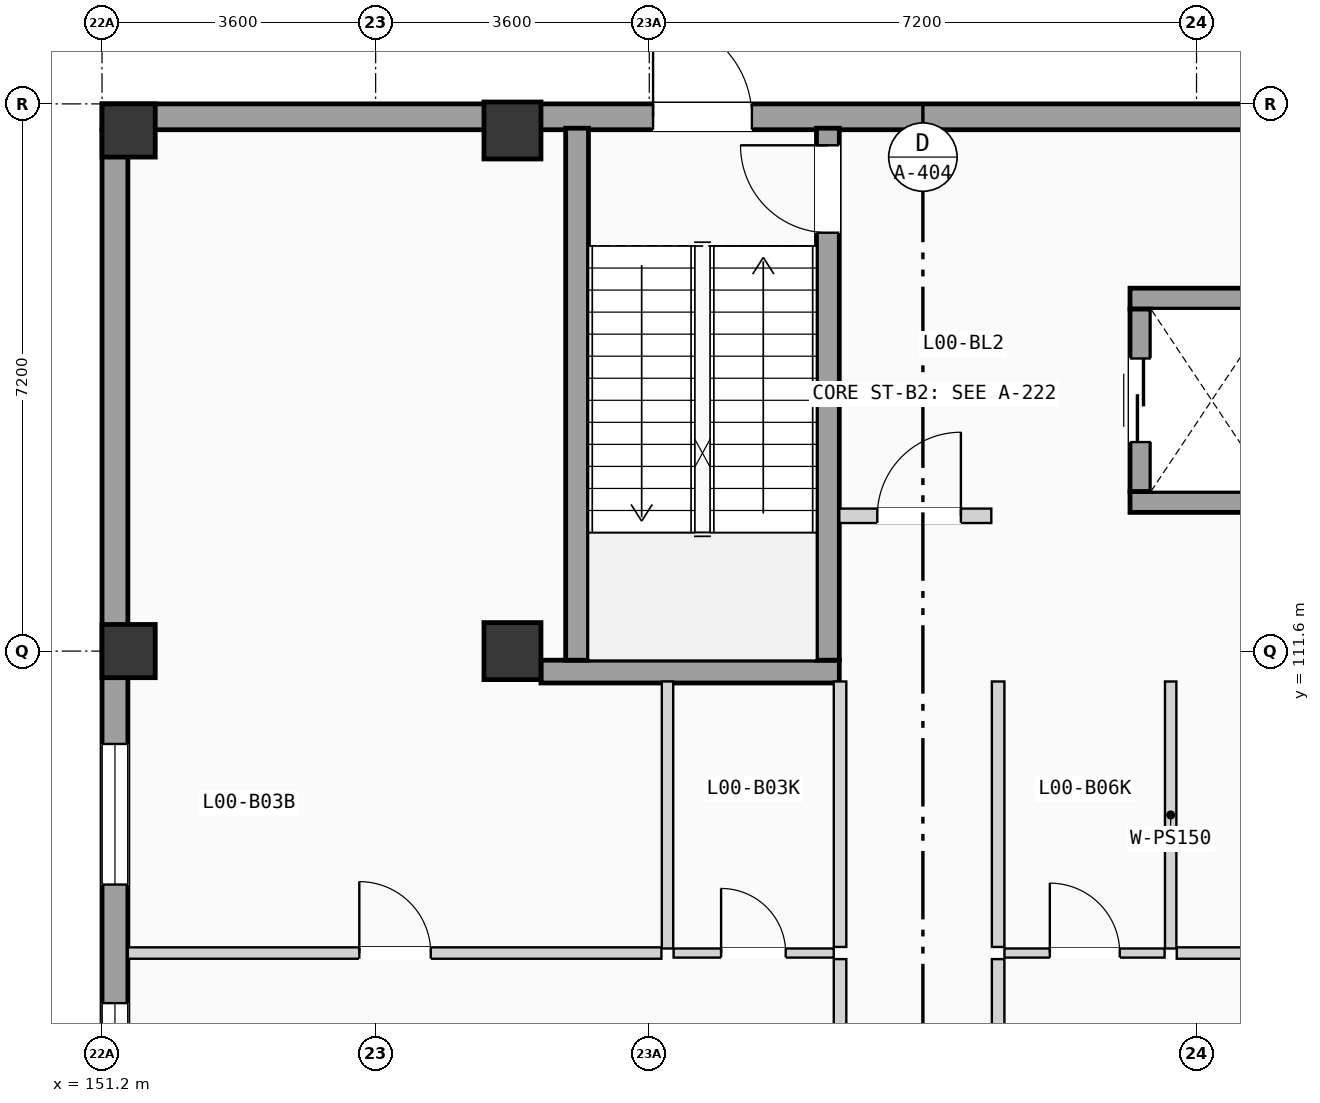
"""IFC4 building model, lengths in metres.
Left out: names, types, materials, properties, quantities, classifications, styles, units other than length and angle.
Written with IfcOpenShell. Run it as: python <this file> out.ifc"""

import sys

from ifc_helpers import new_model, si_unit, direction, frame, frame_2d, origin, origin_2d, place, context, subcontext, project, spatial, rectangle, extrude, element, fill, save


model = new_model("IFC4")
c1 = context("Model", 3, precision=1e-05, world=origin(), true_north=direction((0.0, 1.0)))
c2 = subcontext(c1, "Body", "Model", "MODEL_VIEW")
j1 = project(units=[si_unit("LENGTHUNIT", "METRE"), si_unit("PLANEANGLEUNIT", "RADIAN")], contexts=[c1])
p1 = place(None, origin())
s1 = spatial("IfcSite", under=j1, at=p1, CompositionType="ELEMENT")
p2 = place(p1, origin())
s2 = spatial("IfcBuilding", under=s1, at=p2, CompositionType="ELEMENT")
p3 = place(p2, origin())
s3 = spatial("IfcBuildingStorey", under=s2, at=p3, CompositionType="ELEMENT", Elevation=0.0)
for number, where, z_axis, x_axis in (
    (1, (151.55, 111.6, 0.0), (0.0, 0.0, 1.0), (1.0, 0.0, 0.0)),
    (2, (151.55, 118.45, 0.0), (0.0, 0.0, 1.0), (1.0, 0.0, 0.0)),
):
    element("IfcColumn", number, at=place(p3, frame(where, z_axis=z_axis, x_axis=x_axis)), inside=s3, PredefinedType="COLUMN", context=c2, shape_type="SweptSolid", body=[
        extrude(rectangle(XDim=0.7, YDim=0.7, at=origin_2d()), origin(), (0.0, 0.0, 1.0), 4.9),
    ])
for number, where, z_axis, x_axis in (
    (3, (156.6, 111.6, 0.0), (0.0, 0.0, 1.0), (1.0, 0.0, 0.0)),
    (4, (156.6, 118.45, 0.0), (0.0, 0.0, 1.0), (1.0, 0.0, 0.0)),
):
    element("IfcColumn", number, at=place(p3, frame(where, z_axis=z_axis, x_axis=x_axis)), inside=s3, PredefinedType="COLUMN", context=c2, shape_type="SweptSolid", body=[
        extrude(rectangle(XDim=0.75, YDim=0.75, at=origin_2d()), origin(), (0.0, 0.0, 1.0), 4.9),
    ])
p4 = place(p3, frame((151.2, 118.63, 0.0), z_axis=(0.0, 0.0, 1.0), x_axis=(1.0, 0.0, 0.0)))
e5 = element("IfcWall", 5, at=p4, inside=s3, PredefinedType="SOLIDWALL", context=c2, shape_type="SweptSolid", body=[
    extrude(rectangle(XDim=21.6, YDim=0.34, at=frame_2d((10.8, 0.0))), origin(), (0.0, 0.0, 1.0), 4.64),
])
p5 = place(p4, frame((7.25, 0.0, 0.0)))
e6 = element("IfcOpeningElement", 6, at=p5, cuts=e5, PredefinedType="OPENING", context=c2, shape_type="SweptSolid", body=[
    extrude(rectangle(XDim=1.3, YDim=2.2, at=frame_2d((0.65, 1.1))), frame((0.0, 0.18, 0.0), z_axis=(0.0, -1.0, 0.0), x_axis=(1.0, 0.0, 0.0)), (0.0, 0.0, 1.0), 0.36),
])
p6 = place(p3, frame((151.37, 68.74, 0.0), z_axis=(0.0, 0.0, 1.0), x_axis=(0.0, 1.0, 0.0)))
e7 = element("IfcWall", 7, at=p6, inside=s3, PredefinedType="SOLIDWALL", context=c2, shape_type="SweptSolid", body=[
    extrude(rectangle(XDim=49.72, YDim=0.34, at=frame_2d((24.86, 0.0))), origin(), (0.0, 0.0, 1.0), 4.64),
])
p7 = place(p6, frame((11.552, 0.0, 0.9)))
e8 = element("IfcOpeningElement", 8, at=p7, cuts=e7, PredefinedType="OPENING", context=c2, shape_type="SweptSolid", body=[
    extrude(rectangle(XDim=1.6, YDim=1.65, at=frame_2d((0.8, 0.825))), frame((0.0, 0.18, 0.0), z_axis=(0.0, -1.0, 0.0), x_axis=(1.0, 0.0, 0.0)), (0.0, 0.0, 1.0), 0.36),
])
p8 = place(p6, frame((8.207, 0.0, 0.9)))
e9 = element("IfcOpeningElement", 9, at=p8, cuts=e7, PredefinedType="OPENING", context=c2, shape_type="SweptSolid", body=[
    extrude(rectangle(XDim=1.6, YDim=1.8, at=frame_2d((0.8, 0.9))), frame((0.0, 0.18, 0.0), z_axis=(0.0, -1.0, 0.0), x_axis=(1.0, 0.0, 0.0)), (0.0, 0.0, 1.0), 0.36),
])
p9 = place(p6, frame((16.18, 0.0, 0.9)))
e10 = element("IfcOpeningElement", 10, at=p9, cuts=e7, PredefinedType="OPENING", context=c2, shape_type="SweptSolid", body=[
    extrude(rectangle(XDim=1.72, YDim=1.2, at=frame_2d((0.86, 0.6))), frame((0.0, 0.18, 0.0), z_axis=(0.0, -1.0, 0.0), x_axis=(1.0, 0.0, 0.0)), (0.0, 0.0, 1.0), 0.36),
])
p10 = place(p6, frame((24.0, 0.0, 0.9)))
e11 = element("IfcOpeningElement", 11, at=p10, cuts=e7, PredefinedType="OPENING", context=c2, shape_type="SweptSolid", body=[
    extrude(rectangle(XDim=1.72, YDim=1.35, at=frame_2d((0.86, 0.675))), frame((0.0, 0.18, 0.0), z_axis=(0.0, -1.0, 0.0), x_axis=(1.0, 0.0, 0.0)), (0.0, 0.0, 1.0), 0.36),
])
p11 = place(p6, frame((19.503, 0.0, 0.85)))
e12 = element("IfcOpeningElement", 12, at=p11, cuts=e7, PredefinedType="OPENING", context=c2, shape_type="SweptSolid", body=[
    extrude(rectangle(XDim=0.95, YDim=1.2, at=frame_2d((0.475, 0.6))), frame((0.0, 0.18, 0.0), z_axis=(0.0, -1.0, 0.0), x_axis=(1.0, 0.0, 0.0)), (0.0, 0.0, 1.0), 0.36),
])
p12 = place(p6, frame((29.267, 0.0, 0.85)))
e13 = element("IfcOpeningElement", 13, at=p12, cuts=e7, PredefinedType="OPENING", context=c2, shape_type="SweptSolid", body=[
    extrude(rectangle(XDim=0.95, YDim=1.2, at=frame_2d((0.475, 0.6))), frame((0.0, 0.18, 0.0), z_axis=(0.0, -1.0, 0.0), x_axis=(1.0, 0.0, 0.0)), (0.0, 0.0, 1.0), 0.36),
])
p13 = place(p6, frame((36.508, 0.0, 0.9)))
e14 = element("IfcOpeningElement", 14, at=p13, cuts=e7, PredefinedType="OPENING", context=c2, shape_type="SweptSolid", body=[
    extrude(rectangle(XDim=1.72, YDim=1.8, at=frame_2d((0.86, 0.9))), frame((0.0, 0.18, 0.0), z_axis=(0.0, -1.0, 0.0), x_axis=(1.0, 0.0, 0.0)), (0.0, 0.0, 1.0), 0.36),
])
p14 = place(p6, frame((31.756, 0.0, 0.9)))
e15 = element("IfcOpeningElement", 15, at=p14, cuts=e7, PredefinedType="OPENING", context=c2, shape_type="SweptSolid", body=[
    extrude(rectangle(XDim=1.85, YDim=1.2, at=frame_2d((0.925, 0.6))), frame((0.0, 0.18, 0.0), z_axis=(0.0, -1.0, 0.0), x_axis=(1.0, 0.0, 0.0)), (0.0, 0.0, 1.0), 0.36),
])
p15 = place(p6, frame((39.788, 0.0, 0.9)))
e16 = element("IfcOpeningElement", 16, at=p15, cuts=e7, PredefinedType="OPENING", context=c2, shape_type="SweptSolid", body=[
    extrude(rectangle(XDim=1.85, YDim=1.35, at=frame_2d((0.925, 0.675))), frame((0.0, 0.18, 0.0), z_axis=(0.0, -1.0, 0.0), x_axis=(1.0, 0.0, 0.0)), (0.0, 0.0, 1.0), 0.36),
])
p16 = place(p3, frame((156.975, 111.33, 0.0), z_axis=(0.0, 0.0, 1.0), x_axis=(1.0, 0.0, 0.0)))
e17 = element("IfcWall", 17, at=p16, inside=s3, PredefinedType="SHEAR", context=c2, shape_type="SweptSolid", body=[
    extrude(rectangle(XDim=3.925, YDim=0.3, at=frame_2d((1.962, 0.0))), origin(), (0.0, 0.0, 1.0), 4.64),
])
p17 = place(p3, frame((157.45, 111.48, 0.0), z_axis=(0.0, 0.0, 1.0), x_axis=(0.0, 1.0, 0.0)))
e18 = element("IfcWall", 18, at=p17, inside=s3, PredefinedType="SHEAR", context=c2, shape_type="SweptSolid", body=[
    extrude(rectangle(XDim=7.0, YDim=0.3, at=frame_2d((3.5, 0.0))), origin(), (0.0, 0.0, 1.0), 4.64),
])
p18 = place(p3, frame((160.75, 111.48, 0.0), z_axis=(0.0, 0.0, 1.0), x_axis=(0.0, 1.0, 0.0)))
e19 = element("IfcWall", 19, at=p18, inside=s3, PredefinedType="SHEAR", context=c2, shape_type="SweptSolid", body=[
    extrude(rectangle(XDim=7.0, YDim=0.3, at=frame_2d((3.5, 0.0))), origin(), (0.0, 0.0, 1.0), 4.64),
])
p19 = place(p18, frame((5.625, 0.0, 0.0)))
e20 = element("IfcOpeningElement", 20, at=p19, cuts=e19, PredefinedType="OPENING", context=c2, shape_type="SweptSolid", body=[
    extrude(rectangle(XDim=1.15, YDim=2.12, at=frame_2d((0.575, 1.06))), frame((0.0, 0.16, 0.0), z_axis=(0.0, -1.0, 0.0), x_axis=(1.0, 0.0, 0.0)), (0.0, 0.0, 1.0), 0.32),
])
for number, where, z_axis, x_axis in (
    (21, (164.725, 113.562, 0.0), (0.0, 0.0, 1.0), (1.0, 0.0, 0.0)),
    (22, (164.725, 116.238, 0.0), (0.0, 0.0, 1.0), (1.0, 0.0, 0.0)),
):
    element("IfcWall", number, at=place(p3, frame(where, z_axis=z_axis, x_axis=x_axis)), inside=s3, PredefinedType="SHEAR", context=c2, shape_type="SweptSolid", body=[
        extrude(rectangle(XDim=2.15, YDim=0.275, at=frame_2d((1.075, 0.0))), origin(), (0.0, 0.0, 1.0), 4.64),
    ])
p20 = place(p3, frame((164.863, 113.7, 0.0), z_axis=(0.0, 0.0, 1.0), x_axis=(0.0, 1.0, 0.0)))
e23 = element("IfcWall", 23, at=p20, inside=s3, PredefinedType="SHEAR", context=c2, shape_type="SweptSolid", body=[
    extrude(rectangle(XDim=2.4, YDim=0.275, at=frame_2d((1.2, 0.0))), origin(), (0.0, 0.0, 1.0), 4.64),
])
p21 = place(p20, frame((0.65, 0.0, 0.0)))
e24 = element("IfcOpeningElement", 24, at=p21, cuts=e23, PredefinedType="OPENING", context=c2, shape_type="SweptSolid", body=[
    extrude(rectangle(XDim=1.1, YDim=2.15, at=frame_2d((0.55, 1.075))), frame((0.0, 0.147, 0.0), z_axis=(0.0, -1.0, 0.0), x_axis=(1.0, 0.0, 0.0)), (0.0, 0.0, 1.0), 0.295),
])
p22 = place(p3, frame((160.9, 113.38, 0.0), z_axis=(0.0, 0.0, 1.0), x_axis=(1.0, 0.0, 0.0)))
e25 = element("IfcWall", 25, at=p22, inside=s3, PredefinedType="PARTITIONING", context=c2, shape_type="SweptSolid", body=[
    extrude(rectangle(XDim=2.0, YDim=0.19, at=frame_2d((1.0, 0.0))), origin(), (0.0, 0.0, 1.0), 3.84),
])
p23 = place(p22, frame((0.5, 0.0, 0.0)))
e26 = element("IfcOpeningElement", 26, at=p23, cuts=e25, PredefinedType="OPENING", context=c2, shape_type="SweptSolid", body=[
    extrude(rectangle(XDim=1.1, YDim=2.12, at=frame_2d((0.55, 1.06))), frame((0.0, 0.105, 0.0), z_axis=(0.0, -1.0, 0.0), x_axis=(1.0, 0.0, 0.0)), (0.0, 0.0, 1.0), 0.21),
])
p24 = place(p3, frame((160.91, 103.327, 0.0), z_axis=(0.0, 0.0, 1.0), x_axis=(0.0, 1.0, 0.0)))
e27 = element("IfcWall", 27, at=p24, inside=s3, PredefinedType="PARTITIONING", context=c2, shape_type="SweptSolid", body=[
    extrude(rectangle(XDim=4.22, YDim=0.165, at=frame_2d((2.11, 0.0))), origin(), (0.0, 0.0, 1.0), 3.84),
])
p25 = place(p24, frame((1.605, 0.0, 0.0)))
e28 = element("IfcOpeningElement", 28, at=p25, cuts=e27, PredefinedType="OPENING", context=c2, shape_type="SweptSolid", body=[
    extrude(rectangle(XDim=1.01, YDim=2.11, at=frame_2d((0.505, 1.055))), frame((0.0, 0.093, 0.0), z_axis=(0.0, -1.0, 0.0), x_axis=(1.0, 0.0, 0.0)), (0.0, 0.0, 1.0), 0.185),
])
p26 = place(p3, frame((160.91, 107.707, 0.0), z_axis=(0.0, 0.0, 1.0), x_axis=(0.0, 1.0, 0.0)))
e29 = element("IfcWall", 29, at=p26, inside=s3, PredefinedType="PARTITIONING", context=c2, shape_type="SweptSolid", body=[
    extrude(rectangle(XDim=3.493, YDim=0.165, at=frame_2d((1.747, 0.0))), origin(), (0.0, 0.0, 1.0), 3.84),
])
p27 = place(p3, frame((162.99, 103.327, 0.0), z_axis=(0.0, 0.0, 1.0), x_axis=(0.0, 1.0, 0.0)))
e30 = element("IfcWall", 30, at=p27, inside=s3, PredefinedType="PARTITIONING", context=c2, shape_type="SweptSolid", body=[
    extrude(rectangle(XDim=4.22, YDim=0.165, at=frame_2d((2.11, 0.0))), origin(), (0.0, 0.0, 1.0), 3.84),
])
p28 = place(p27, frame((1.605, 0.0, 0.0)))
e31 = element("IfcOpeningElement", 31, at=p28, cuts=e30, PredefinedType="OPENING", context=c2, shape_type="SweptSolid", body=[
    extrude(rectangle(XDim=1.01, YDim=2.11, at=frame_2d((0.505, 1.055))), frame((0.0, 0.093, 0.0), z_axis=(0.0, -1.0, 0.0), x_axis=(1.0, 0.0, 0.0)), (0.0, 0.0, 1.0), 0.185),
])
p29 = place(p3, frame((162.99, 107.707, 0.0), z_axis=(0.0, 0.0, 1.0), x_axis=(0.0, 1.0, 0.0)))
e32 = element("IfcWall", 32, at=p29, inside=s3, PredefinedType="PARTITIONING", context=c2, shape_type="SweptSolid", body=[
    extrude(rectangle(XDim=3.493, YDim=0.165, at=frame_2d((1.747, 0.0))), origin(), (0.0, 0.0, 1.0), 3.84),
])
p30 = place(p3, frame((158.72, 107.627, 0.0), z_axis=(0.0, 0.0, 1.0), x_axis=(1.0, 0.0, 0.0)))
e33 = element("IfcWall", 33, at=p30, inside=s3, PredefinedType="PARTITIONING", context=c2, shape_type="SweptSolid", body=[
    extrude(rectangle(XDim=2.107, YDim=0.12, at=frame_2d((1.053, 0.0))), origin(), (0.0, 0.0, 1.0), 3.84),
])
p31 = place(p30, frame((0.625, 0.0, 0.0)))
e34 = element("IfcOpeningElement", 34, at=p31, cuts=e33, PredefinedType="OPENING", context=c2, shape_type="SweptSolid", body=[
    extrude(rectangle(XDim=0.85, YDim=2.01, at=frame_2d((0.425, 1.005))), frame((0.0, 0.07, 0.0), z_axis=(0.0, -1.0, 0.0), x_axis=(1.0, 0.0, 0.0)), (0.0, 0.0, 1.0), 0.14),
])
p32 = place(p3, frame((151.54, 107.627, 0.0), z_axis=(0.0, 0.0, 1.0), x_axis=(1.0, 0.0, 0.0)))
e35 = element("IfcWall", 35, at=p32, inside=s3, PredefinedType="PARTITIONING", context=c2, shape_type="SweptSolid", body=[
    extrude(rectangle(XDim=7.02, YDim=0.15, at=frame_2d((3.51, 0.0))), origin(), (0.0, 0.0, 1.0), 3.84),
])
p33 = place(p32, frame((3.045, 0.0, 0.0)))
e36 = element("IfcOpeningElement", 36, at=p33, cuts=e35, PredefinedType="OPENING", context=c2, shape_type="SweptSolid", body=[
    extrude(rectangle(XDim=0.94, YDim=2.06, at=frame_2d((0.47, 1.03))), frame((0.0, 0.085, 0.0), z_axis=(0.0, -1.0, 0.0), x_axis=(1.0, 0.0, 0.0)), (0.0, 0.0, 1.0), 0.17),
])
p34 = place(p3, frame((158.64, 107.687, 0.0), z_axis=(0.0, 0.0, 1.0), x_axis=(0.0, 1.0, 0.0)))
e37 = element("IfcWall", 37, at=p34, inside=s3, PredefinedType="PARTITIONING", context=c2, shape_type="SweptSolid", body=[
    extrude(rectangle(XDim=3.513, YDim=0.15, at=frame_2d((1.756, 0.0))), origin(), (0.0, 0.0, 1.0), 3.84),
])
p35 = place(p3, frame((163.073, 107.627, 0.0), z_axis=(0.0, 0.0, 1.0), x_axis=(1.0, 0.0, 0.0)))
e38 = element("IfcWall", 38, at=p35, inside=s3, PredefinedType="PARTITIONING", context=c2, shape_type="SweptSolid", body=[
    extrude(rectangle(XDim=2.107, YDim=0.12, at=frame_2d((1.053, 0.0))), origin(), (0.0, 0.0, 1.0), 3.84),
])
p36 = place(p35, frame((0.597, 0.0, 0.0)))
e39 = element("IfcOpeningElement", 39, at=p36, cuts=e38, PredefinedType="OPENING", context=c2, shape_type="SweptSolid", body=[
    extrude(rectangle(XDim=0.92, YDim=2.02, at=frame_2d((0.46, 1.01))), frame((0.0, 0.07, 0.0), z_axis=(0.0, -1.0, 0.0), x_axis=(1.0, 0.0, 0.0)), (0.0, 0.0, 1.0), 0.14),
])
p37 = place(p3, frame((165.34, 107.627, 0.0), z_axis=(0.0, 0.0, 1.0), x_axis=(1.0, 0.0, 0.0)))
e40 = element("IfcWall", 40, at=p37, inside=s3, PredefinedType="PARTITIONING", context=c2, shape_type="SweptSolid", body=[
    extrude(rectangle(XDim=7.12, YDim=0.15, at=frame_2d((3.56, 0.0))), origin(), (0.0, 0.0, 1.0), 3.84),
])
p38 = place(p37, frame((3.035, 0.0, 0.0)))
e41 = element("IfcOpeningElement", 41, at=p38, cuts=e40, PredefinedType="OPENING", context=c2, shape_type="SweptSolid", body=[
    extrude(rectangle(XDim=1.04, YDim=2.08, at=frame_2d((0.52, 1.04))), frame((0.0, 0.085, 0.0), z_axis=(0.0, -1.0, 0.0), x_axis=(1.0, 0.0, 0.0)), (0.0, 0.0, 1.0), 0.17),
])
p39 = place(p3, frame((165.26, 107.687, 0.0), z_axis=(0.0, 0.0, 1.0), x_axis=(0.0, 1.0, 0.0)))
e42 = element("IfcWall", 42, at=p39, inside=s3, PredefinedType="PARTITIONING", context=c2, shape_type="SweptSolid", body=[
    extrude(rectangle(XDim=3.513, YDim=0.15, at=frame_2d((1.756, 0.0))), origin(), (0.0, 0.0, 1.0), 3.84),
])
p40 = place(p5, origin())
e43 = element("IfcDoor", 43, at=p40, inside=s3, OperationType="SINGLE_SWING_LEFT", PredefinedType="DOOR", context=c2, shape_type="SweptSolid", body=[
    extrude(rectangle(XDim=1.3, YDim=2.2, at=frame_2d((0.65, 1.1))), frame((0.0, 0.025, 0.0), z_axis=(0.0, -1.0, 0.0), x_axis=(1.0, 0.0, 0.0)), (0.0, 0.0, 1.0), 0.05),
])
fill(e6, e43)
p41 = place(p13, origin())
e44 = element("IfcWindow", 44, at=p41, inside=s3, PartitioningType="DOUBLE_PANEL_VERTICAL", PredefinedType="WINDOW", context=c2, shape_type="SweptSolid", body=[
    extrude(rectangle(XDim=1.72, YDim=1.8, at=frame_2d((0.86, 0.9))), frame((0.0, 0.03, 0.0), z_axis=(0.0, -1.0, 0.0), x_axis=(1.0, 0.0, 0.0)), (0.0, 0.0, 1.0), 0.06),
])
fill(e14, e44)
p42 = place(p15, origin())
e45 = element("IfcWindow", 45, at=p42, inside=s3, PartitioningType="DOUBLE_PANEL_VERTICAL", PredefinedType="WINDOW", context=c2, shape_type="SweptSolid", body=[
    extrude(rectangle(XDim=1.85, YDim=1.35, at=frame_2d((0.925, 0.675))), frame((0.0, 0.03, 0.0), z_axis=(0.0, -1.0, 0.0), x_axis=(1.0, 0.0, 0.0)), (0.0, 0.0, 1.0), 0.06),
])
fill(e16, e45)
p43 = place(p19, origin())
e46 = element("IfcDoor", 46, at=p43, inside=s3, OperationType="SINGLE_SWING_RIGHT", PredefinedType="DOOR", context=c2, shape_type="SweptSolid", body=[
    extrude(rectangle(XDim=1.15, YDim=2.12, at=frame_2d((0.575, 1.06))), frame((0.0, 0.025, 0.0), z_axis=(0.0, -1.0, 0.0), x_axis=(1.0, 0.0, 0.0)), (0.0, 0.0, 1.0), 0.05),
])
fill(e20, e46)
p44 = place(p21, origin())
e47 = element("IfcDoor", 47, at=p44, inside=s3, OperationType="SLIDING_TO_LEFT", PredefinedType="DOOR", context=c2, shape_type="SweptSolid", body=[
    extrude(rectangle(XDim=1.1, YDim=2.15, at=frame_2d((0.55, 1.075))), frame((0.0, 0.025, 0.0), z_axis=(0.0, -1.0, 0.0), x_axis=(1.0, 0.0, 0.0)), (0.0, 0.0, 1.0), 0.05),
])
fill(e24, e47)
p45 = place(p23, origin())
e48 = element("IfcDoor", 48, at=p45, inside=s3, OperationType="SINGLE_SWING_RIGHT", PredefinedType="DOOR", context=c2, shape_type="SweptSolid", body=[
    extrude(rectangle(XDim=1.1, YDim=2.12, at=frame_2d((0.55, 1.06))), frame((0.0, 0.025, 0.0), z_axis=(0.0, -1.0, 0.0), x_axis=(1.0, 0.0, 0.0)), (0.0, 0.0, 1.0), 0.05),
])
fill(e26, e48)
p46 = place(p31, origin())
e49 = element("IfcDoor", 49, at=p46, inside=s3, OperationType="SINGLE_SWING_LEFT", PredefinedType="DOOR", context=c2, shape_type="SweptSolid", body=[
    extrude(rectangle(XDim=0.85, YDim=2.01, at=frame_2d((0.425, 1.005))), frame((0.0, 0.025, 0.0), z_axis=(0.0, -1.0, 0.0), x_axis=(1.0, 0.0, 0.0)), (0.0, 0.0, 1.0), 0.05),
])
fill(e34, e49)
p47 = place(p33, origin())
e50 = element("IfcDoor", 50, at=p47, inside=s3, OperationType="SINGLE_SWING_LEFT", PredefinedType="DOOR", context=c2, shape_type="SweptSolid", body=[
    extrude(rectangle(XDim=0.94, YDim=2.06, at=frame_2d((0.47, 1.03))), frame((0.0, 0.025, 0.0), z_axis=(0.0, -1.0, 0.0), x_axis=(1.0, 0.0, 0.0)), (0.0, 0.0, 1.0), 0.05),
])
fill(e36, e50)
p48 = place(p36, origin())
e51 = element("IfcDoor", 51, at=p48, inside=s3, OperationType="SINGLE_SWING_LEFT", PredefinedType="DOOR", context=c2, shape_type="SweptSolid", body=[
    extrude(rectangle(XDim=0.92, YDim=2.02, at=frame_2d((0.46, 1.01))), frame((0.0, 0.025, 0.0), z_axis=(0.0, -1.0, 0.0), x_axis=(1.0, 0.0, 0.0)), (0.0, 0.0, 1.0), 0.05),
])
fill(e39, e51)
save(model, sys.argv[1])
